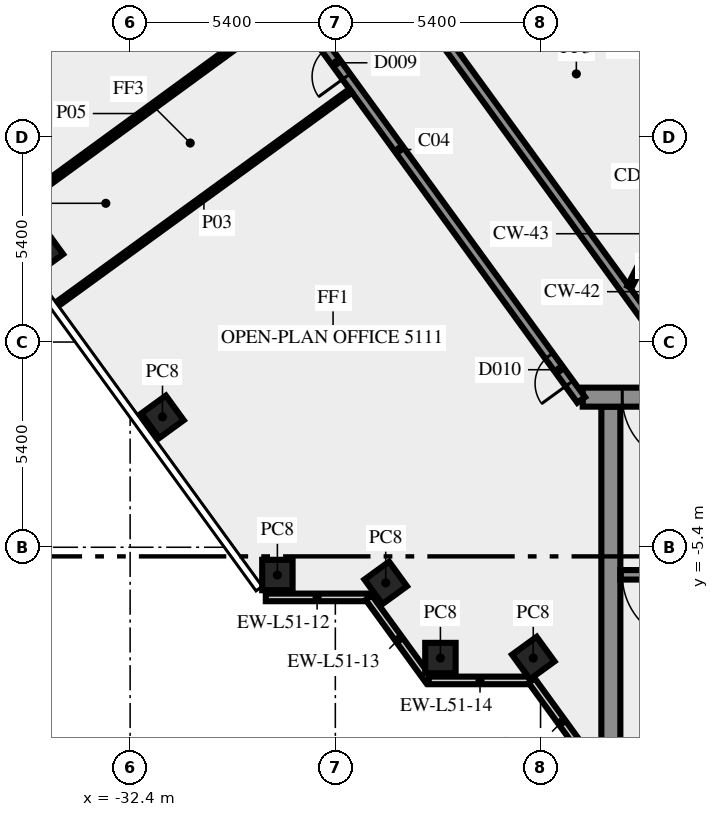
"""IFC4 building model, lengths in metres.
Left out: names, types, materials, properties, quantities, classifications, styles, units other than length and angle.
Written with IfcOpenShell. Run it as: python <this file> out.ifc"""

import sys

from ifc_helpers import new_model, si_unit, direction, frame, frame_2d, origin, origin_2d, place, context, subcontext, project, spatial, rectangle, extrude, element, fill, save


model = new_model("IFC4")
c1 = context("Model", 3, precision=1e-05, world=origin(), true_north=direction((0.0, 1.0)))
c2 = subcontext(c1, "Body", "Model", "MODEL_VIEW")
j1 = project(units=[si_unit("LENGTHUNIT", "METRE"), si_unit("PLANEANGLEUNIT", "RADIAN")], contexts=[c1])
p1 = place(None, origin())
s1 = spatial("IfcSite", under=j1, at=p1, CompositionType="ELEMENT")
p2 = place(p1, origin())
s2 = spatial("IfcBuilding", under=s1, at=p2, CompositionType="ELEMENT")
p3 = place(p2, frame((0.0, 0.0, 218.0)))
s3 = spatial("IfcBuildingStorey", under=s2, at=p3, CompositionType="ELEMENT", Elevation=218.0)
for number, where, z_axis, x_axis in (
    (1, (-34.722, 2.4, 0.0), (0.0, 0.0, 1.0), (0.588, -0.809, 0.0)),
    (2, (-31.548, -1.969, 0.0), (0.0, 0.0, 1.0), (0.588, -0.809, 0.0)),
    (3, (-28.525, -6.13, 0.0), (0.0, 0.0, 1.0), (1.0, 0.0, 0.0)),
    (4, (-25.674, -6.337, 0.0), (0.0, 0.0, 1.0), (0.588, -0.809, 0.0)),
    (5, (-24.235, -8.315, 0.0), (0.0, 0.0, 1.0), (1.0, 0.0, 0.0)),
    (6, (-21.792, -8.315, 0.0), (0.0, 0.0, 1.0), (0.588, -0.809, 0.0)),
):
    element("IfcColumn", number, at=place(p3, frame(where, z_axis=z_axis, x_axis=x_axis)), inside=s3, PredefinedType="COLUMN", context=c2, shape_type="SweptSolid", body=[
        extrude(rectangle(XDim=0.8, YDim=0.8, at=origin_2d()), origin(), (0.0, 0.0, 1.0), 3.65),
    ])
p4 = place(p3, frame((-28.83, -6.719, 0.0), z_axis=(0.0, 0.0, 1.0), x_axis=(1.0, 0.0, 0.0)))
e7 = element("IfcWall", 7, at=p4, inside=s3, PredefinedType="SOLIDWALL", context=c2, shape_type="SweptSolid", body=[
    extrude(rectangle(XDim=2.7, YDim=0.2, at=frame_2d((1.35, 0.0))), origin(), (0.0, 0.0, 1.0), 3.65),
])
p5 = place(p3, frame((-26.12, -6.724, 0.0), z_axis=(0.0, 0.0, 1.0), x_axis=(0.587720002413, -0.809064397168, 0.0)))
e8 = element("IfcWall", 8, at=p5, inside=s3, PredefinedType="SOLIDWALL", context=c2, shape_type="SweptSolid", body=[
    extrude(rectangle(XDim=2.7, YDim=0.2, at=frame_2d((1.35, 0.0))), origin(), (0.0, 0.0, 1.0), 3.65),
])
p6 = place(p3, frame((-24.543, -8.904, 0.0), z_axis=(0.0, 0.0, 1.0), x_axis=(1.0, 0.0, 0.0)))
e9 = element("IfcWall", 9, at=p6, inside=s3, PredefinedType="SOLIDWALL", context=c2, shape_type="SweptSolid", body=[
    extrude(rectangle(XDim=2.7, YDim=0.2, at=frame_2d((1.35, 0.0))), origin(), (0.0, 0.0, 1.0), 3.65),
])
p7 = place(p3, frame((-21.833, -8.909, 0.0), z_axis=(0.0, 0.0, 1.0), x_axis=(0.587766567315, -0.809030569476, 0.0)))
e10 = element("IfcWall", 10, at=p7, inside=s3, PredefinedType="SOLIDWALL", context=c2, shape_type="SweptSolid", body=[
    extrude(rectangle(XDim=2.688, YDim=0.2, at=frame_2d((1.344, 0.0))), origin(), (0.0, 0.0, 1.0), 3.65),
])
p8 = place(p3, frame((-19.75, -10.5, 0.0), z_axis=(0.0, 0.0, 1.0), x_axis=(0.0, 1.0, 0.0)))
e11 = element("IfcWall", 11, at=p8, inside=s3, PredefinedType="SHEAR", context=c2, shape_type="SweptSolid", body=[
    extrude(rectangle(XDim=8.8, YDim=0.5, at=frame_2d((4.4, 0.0))), origin(), (0.0, 0.0, 1.0), 3.65),
])
p9 = place(p3, frame((-11.45, -6.125, 0.0), z_axis=(0.0, 0.0, 1.0), x_axis=(-1.0, 0.0, 0.0)))
e12 = element("IfcWall", 12, at=p9, inside=s3, PredefinedType="SHEAR", context=c2, shape_type="SweptSolid", body=[
    extrude(rectangle(XDim=8.05, YDim=0.25, at=frame_2d((4.025, 0.0))), origin(), (0.0, 0.0, 1.0), 3.65),
])
p10 = place(p9, frame((6.2, 0.0, 0.0)))
e13 = element("IfcOpeningElement", 13, at=p10, cuts=e12, PredefinedType="OPENING", context=c2, shape_type="SweptSolid", body=[
    extrude(rectangle(XDim=1.8, YDim=2.1, at=frame_2d((0.9, 1.05))), frame((0.0, 0.135, 0.0), z_axis=(0.0, -1.0, 0.0), x_axis=(1.0, 0.0, 0.0)), (0.0, 0.0, 1.0), 0.27),
])
p11 = place(p3, frame((20.49, -1.45, 0.0), z_axis=(0.0, 0.0, 1.0), x_axis=(-1.0, 0.0, 0.0)))
e14 = element("IfcWall", 14, at=p11, inside=s3, PredefinedType="SHEAR", context=c2, shape_type="SweptSolid", body=[
    extrude(rectangle(XDim=40.98, YDim=0.5, at=frame_2d((20.49, 0.0))), origin(), (0.0, 0.0, 1.0), 3.65),
])
p12 = place(p11, frame((38.14, 0.0, 0.0)))
e15 = element("IfcOpeningElement", 15, at=p12, cuts=e14, PredefinedType="OPENING", context=c2, shape_type="SweptSolid", body=[
    extrude(rectangle(XDim=1.8, YDim=2.1, at=frame_2d((0.9, 1.05))), frame((0.0, 0.26, 0.0), z_axis=(0.0, -1.0, 0.0), x_axis=(1.0, 0.0, 0.0)), (0.0, 0.0, 1.0), 0.52),
])
p13 = place(p11, frame((36.728, 0.0, 0.0)))
e16 = element("IfcOpeningElement", 16, at=p13, cuts=e14, PredefinedType="OPENING", context=c2, shape_type="SweptSolid", body=[
    extrude(rectangle(XDim=0.8, YDim=2.1, at=frame_2d((0.4, 1.05))), frame((0.0, 0.26, 0.0), z_axis=(0.0, -1.0, 0.0), x_axis=(1.0, 0.0, 0.0)), (0.0, 0.0, 1.0), 0.52),
])
p14 = place(p11, frame((35.153, 0.0, 0.0)))
e17 = element("IfcOpeningElement", 17, at=p14, cuts=e14, PredefinedType="OPENING", context=c2, shape_type="SweptSolid", body=[
    extrude(rectangle(XDim=0.8, YDim=2.1, at=frame_2d((0.4, 1.05))), frame((0.0, 0.26, 0.0), z_axis=(0.0, -1.0, 0.0), x_axis=(1.0, 0.0, 0.0)), (0.0, 0.0, 1.0), 0.52),
])
p15 = place(p11, frame((32.94, 0.0, 0.0)))
e18 = element("IfcOpeningElement", 18, at=p15, cuts=e14, PredefinedType="OPENING", context=c2, shape_type="SweptSolid", body=[
    extrude(rectangle(XDim=0.9, YDim=2.1, at=frame_2d((0.45, 1.05))), frame((0.0, 0.26, 0.0), z_axis=(0.0, -1.0, 0.0), x_axis=(1.0, 0.0, 0.0)), (0.0, 0.0, 1.0), 0.52),
])
p16 = place(p11, frame((30.202, 0.0, 0.0)))
e19 = element("IfcOpeningElement", 19, at=p16, cuts=e14, PredefinedType="OPENING", context=c2, shape_type="SweptSolid", body=[
    extrude(rectangle(XDim=0.9, YDim=2.1, at=frame_2d((0.45, 1.05))), frame((0.0, 0.26, 0.0), z_axis=(0.0, -1.0, 0.0), x_axis=(1.0, 0.0, 0.0)), (0.0, 0.0, 1.0), 0.52),
])
p17 = place(p11, frame((27.74, 0.0, 0.0)))
e20 = element("IfcOpeningElement", 20, at=p17, cuts=e14, PredefinedType="OPENING", context=c2, shape_type="SweptSolid", body=[
    extrude(rectangle(XDim=0.9, YDim=2.1, at=frame_2d((0.45, 1.05))), frame((0.0, 0.26, 0.0), z_axis=(0.0, -1.0, 0.0), x_axis=(1.0, 0.0, 0.0)), (0.0, 0.0, 1.0), 0.52),
])
p18 = place(p11, frame((25.377, 0.0, 0.0)))
e21 = element("IfcOpeningElement", 21, at=p18, cuts=e14, PredefinedType="OPENING", context=c2, shape_type="SweptSolid", body=[
    extrude(rectangle(XDim=0.9, YDim=2.1, at=frame_2d((0.45, 1.05))), frame((0.0, 0.26, 0.0), z_axis=(0.0, -1.0, 0.0), x_axis=(1.0, 0.0, 0.0)), (0.0, 0.0, 1.0), 0.52),
])
p19 = place(p11, frame((20.74, 0.0, 0.0)))
e22 = element("IfcOpeningElement", 22, at=p19, cuts=e14, PredefinedType="OPENING", context=c2, shape_type="SweptSolid", body=[
    extrude(rectangle(XDim=2.0, YDim=2.1, at=frame_2d((1.0, 1.05))), frame((0.0, 0.26, 0.0), z_axis=(0.0, -1.0, 0.0), x_axis=(1.0, 0.0, 0.0)), (0.0, 0.0, 1.0), 0.52),
])
p20 = place(p11, frame((7.14, 0.0, 0.0)))
e23 = element("IfcOpeningElement", 23, at=p20, cuts=e14, PredefinedType="OPENING", context=c2, shape_type="SweptSolid", body=[
    extrude(rectangle(XDim=0.9, YDim=2.1, at=frame_2d((0.45, 1.05))), frame((0.0, 0.26, 0.0), z_axis=(0.0, -1.0, 0.0), x_axis=(1.0, 0.0, 0.0)), (0.0, 0.0, 1.0), 0.52),
])
p21 = place(p11, frame((4.19, 0.0, 0.0)))
e24 = element("IfcOpeningElement", 24, at=p21, cuts=e14, PredefinedType="OPENING", context=c2, shape_type="SweptSolid", body=[
    extrude(rectangle(XDim=0.9, YDim=2.1, at=frame_2d((0.45, 1.05))), frame((0.0, 0.26, 0.0), z_axis=(0.0, -1.0, 0.0), x_axis=(1.0, 0.0, 0.0)), (0.0, 0.0, 1.0), 0.52),
])
p22 = place(p11, frame((1.04, 0.0, 0.0)))
e25 = element("IfcOpeningElement", 25, at=p22, cuts=e14, PredefinedType="OPENING", context=c2, shape_type="SweptSolid", body=[
    extrude(rectangle(XDim=1.8, YDim=2.1, at=frame_2d((0.9, 1.05))), frame((0.0, 0.26, 0.0), z_axis=(0.0, -1.0, 0.0), x_axis=(1.0, 0.0, 0.0)), (0.0, 0.0, 1.0), 0.52),
])
p23 = place(p3, frame((-20.531, -1.523, 0.0), z_axis=(0.0, 0.0, 1.0), x_axis=(-0.587784239999, 0.809017729849, 0.0)))
e26 = element("IfcWall", 26, at=p23, inside=s3, PredefinedType="SOLIDWALL", context=c2, shape_type="SweptSolid", body=[
    extrude(rectangle(XDim=23.271, YDim=0.25, at=frame_2d((11.635, 0.0))), origin(), (0.0, 0.0, 1.0), 3.65),
])
p24 = place(p23, frame((0.533, 0.0, 0.0)))
e27 = element("IfcOpeningElement", 27, at=p24, cuts=e26, PredefinedType="OPENING", context=c2, shape_type="SweptSolid", body=[
    extrude(rectangle(XDim=0.9, YDim=2.1, at=frame_2d((0.45, 1.05))), frame((0.0, 0.135, 0.0), z_axis=(0.0, -1.0, 0.0), x_axis=(1.0, 0.0, 0.0)), (0.0, 0.0, 1.0), 0.27),
])
p25 = place(p23, frame((17.106, 0.0, 0.0)))
e28 = element("IfcOpeningElement", 28, at=p25, cuts=e26, PredefinedType="OPENING", context=c2, shape_type="SweptSolid", body=[
    extrude(rectangle(XDim=1.8, YDim=2.1, at=frame_2d((0.9, 1.05))), frame((0.0, 0.135, 0.0), z_axis=(0.0, -1.0, 0.0), x_axis=(1.0, 0.0, 0.0)), (0.0, 0.0, 1.0), 0.27),
])
p26 = place(p23, frame((10.516, 0.0, 0.0)))
e29 = element("IfcOpeningElement", 29, at=p26, cuts=e26, PredefinedType="OPENING", context=c2, shape_type="SweptSolid", body=[
    extrude(rectangle(XDim=0.9, YDim=2.1, at=frame_2d((0.45, 1.05))), frame((0.0, 0.135, 0.0), z_axis=(0.0, -1.0, 0.0), x_axis=(1.0, 0.0, 0.0)), (0.0, 0.0, 1.0), 0.27),
])
p27 = place(p3, frame((-31.918, 18.658, 0.0), z_axis=(0.0, 0.0, 1.0), x_axis=(0.587788731405, -0.80901446664, 0.0)))
e30 = element("IfcWall", 30, at=p27, inside=s3, PredefinedType="SOLIDWALL", context=c2, shape_type="SweptSolid", body=[
    extrude(rectangle(XDim=24.453, YDim=0.25, at=frame_2d((12.227, 0.0))), origin(), (0.0, 0.0, 1.0), 3.65),
])
p28 = place(p27, frame((8.395, 0.0, 0.0)))
e31 = element("IfcOpeningElement", 31, at=p28, cuts=e30, PredefinedType="OPENING", context=c2, shape_type="SweptSolid", body=[
    extrude(rectangle(XDim=1.0, YDim=2.1, at=frame_2d((0.5, 1.05))), frame((0.0, 0.135, 0.0), z_axis=(0.0, -1.0, 0.0), x_axis=(1.0, 0.0, 0.0)), (0.0, 0.0, 1.0), 0.27),
])
p29 = place(p27, frame((10.095, 0.0, 0.0)))
e32 = element("IfcOpeningElement", 32, at=p29, cuts=e30, PredefinedType="OPENING", context=c2, shape_type="SweptSolid", body=[
    extrude(rectangle(XDim=0.9, YDim=2.1, at=frame_2d((0.45, 1.05))), frame((0.0, 0.135, 0.0), z_axis=(0.0, -1.0, 0.0), x_axis=(1.0, 0.0, 0.0)), (0.0, 0.0, 1.0), 0.27),
])
p30 = place(p3, frame((-26.595, 6.611, 0.0), z_axis=(0.0, 0.0, 1.0), x_axis=(-0.80900684162, -0.587799226107, 0.0)))
e33 = element("IfcWall", 33, at=p30, inside=s3, PredefinedType="PARTITIONING", context=c2, shape_type="SweptSolid", body=[
    extrude(rectangle(XDim=9.55, YDim=0.12, at=frame_2d((4.775, 0.0))), origin(), (0.0, 0.0, 1.0), 2.85),
])
p31 = place(p3, frame((-35.919, 3.197, 0.0), z_axis=(0.0, 0.0, 1.0), x_axis=(0.807645841498, 0.589667868135, 0.0)))
e34 = element("IfcWall", 34, at=p31, inside=s3, PredefinedType="PARTITIONING", context=c2, shape_type="SweptSolid", body=[
    extrude(rectangle(XDim=9.551, YDim=0.15, at=frame_2d((4.775, 0.0))), origin(), (0.0, 0.0, 1.0), 2.85),
])
p32 = place(p3, frame((-19.261, 1.45, 0.0), z_axis=(0.0, 0.0, 1.0), x_axis=(0.453950796792, 0.891026752736, 0.0)))
e35 = element("IfcWall", 35, at=p32, inside=s3, PredefinedType="PARTITIONING", context=c2, shape_type="SweptSolid", body=[
    extrude(rectangle(XDim=2.778, YDim=0.12, at=frame_2d((1.389, 0.0))), origin(), (0.0, 0.0, 1.0), 3.65),
])
p33 = place(p10, origin())
e36 = element("IfcDoor", 36, at=p33, inside=s3, OperationType="DOUBLE_DOOR_SINGLE_SWING", PredefinedType="DOOR", context=c2, shape_type="SweptSolid", body=[
    extrude(rectangle(XDim=1.8, YDim=2.1, at=frame_2d((0.9, 1.05))), frame((0.0, 0.025, 0.0), z_axis=(0.0, -1.0, 0.0), x_axis=(1.0, 0.0, 0.0)), (0.0, 0.0, 1.0), 0.05),
])
fill(e13, e36)
p34 = place(p12, origin())
e37 = element("IfcDoor", 37, at=p34, inside=s3, OperationType="DOUBLE_DOOR_SINGLE_SWING", PredefinedType="DOOR", context=c2, shape_type="SweptSolid", body=[
    extrude(rectangle(XDim=1.8, YDim=2.1, at=frame_2d((0.9, 1.05))), frame((0.0, 0.025, 0.0), z_axis=(0.0, -1.0, 0.0), x_axis=(1.0, 0.0, 0.0)), (0.0, 0.0, 1.0), 0.05),
])
fill(e15, e37)
p35 = place(p24, origin())
e38 = element("IfcDoor", 38, at=p35, inside=s3, OperationType="SINGLE_SWING_LEFT", PredefinedType="DOOR", context=c2, shape_type="SweptSolid", body=[
    extrude(rectangle(XDim=0.9, YDim=2.1, at=frame_2d((0.45, 1.05))), frame((0.0, 0.025, 0.0), z_axis=(0.0, -1.0, 0.0), x_axis=(1.0, 0.0, 0.0)), (0.0, 0.0, 1.0), 0.05),
])
fill(e27, e38)
p36 = place(p26, origin())
e39 = element("IfcDoor", 39, at=p36, inside=s3, OperationType="SINGLE_SWING_LEFT", PredefinedType="DOOR", context=c2, shape_type="SweptSolid", body=[
    extrude(rectangle(XDim=0.9, YDim=2.1, at=frame_2d((0.45, 1.05))), frame((0.0, 0.025, 0.0), z_axis=(0.0, -1.0, 0.0), x_axis=(1.0, 0.0, 0.0)), (0.0, 0.0, 1.0), 0.05),
])
fill(e29, e39)
save(model, sys.argv[1])
